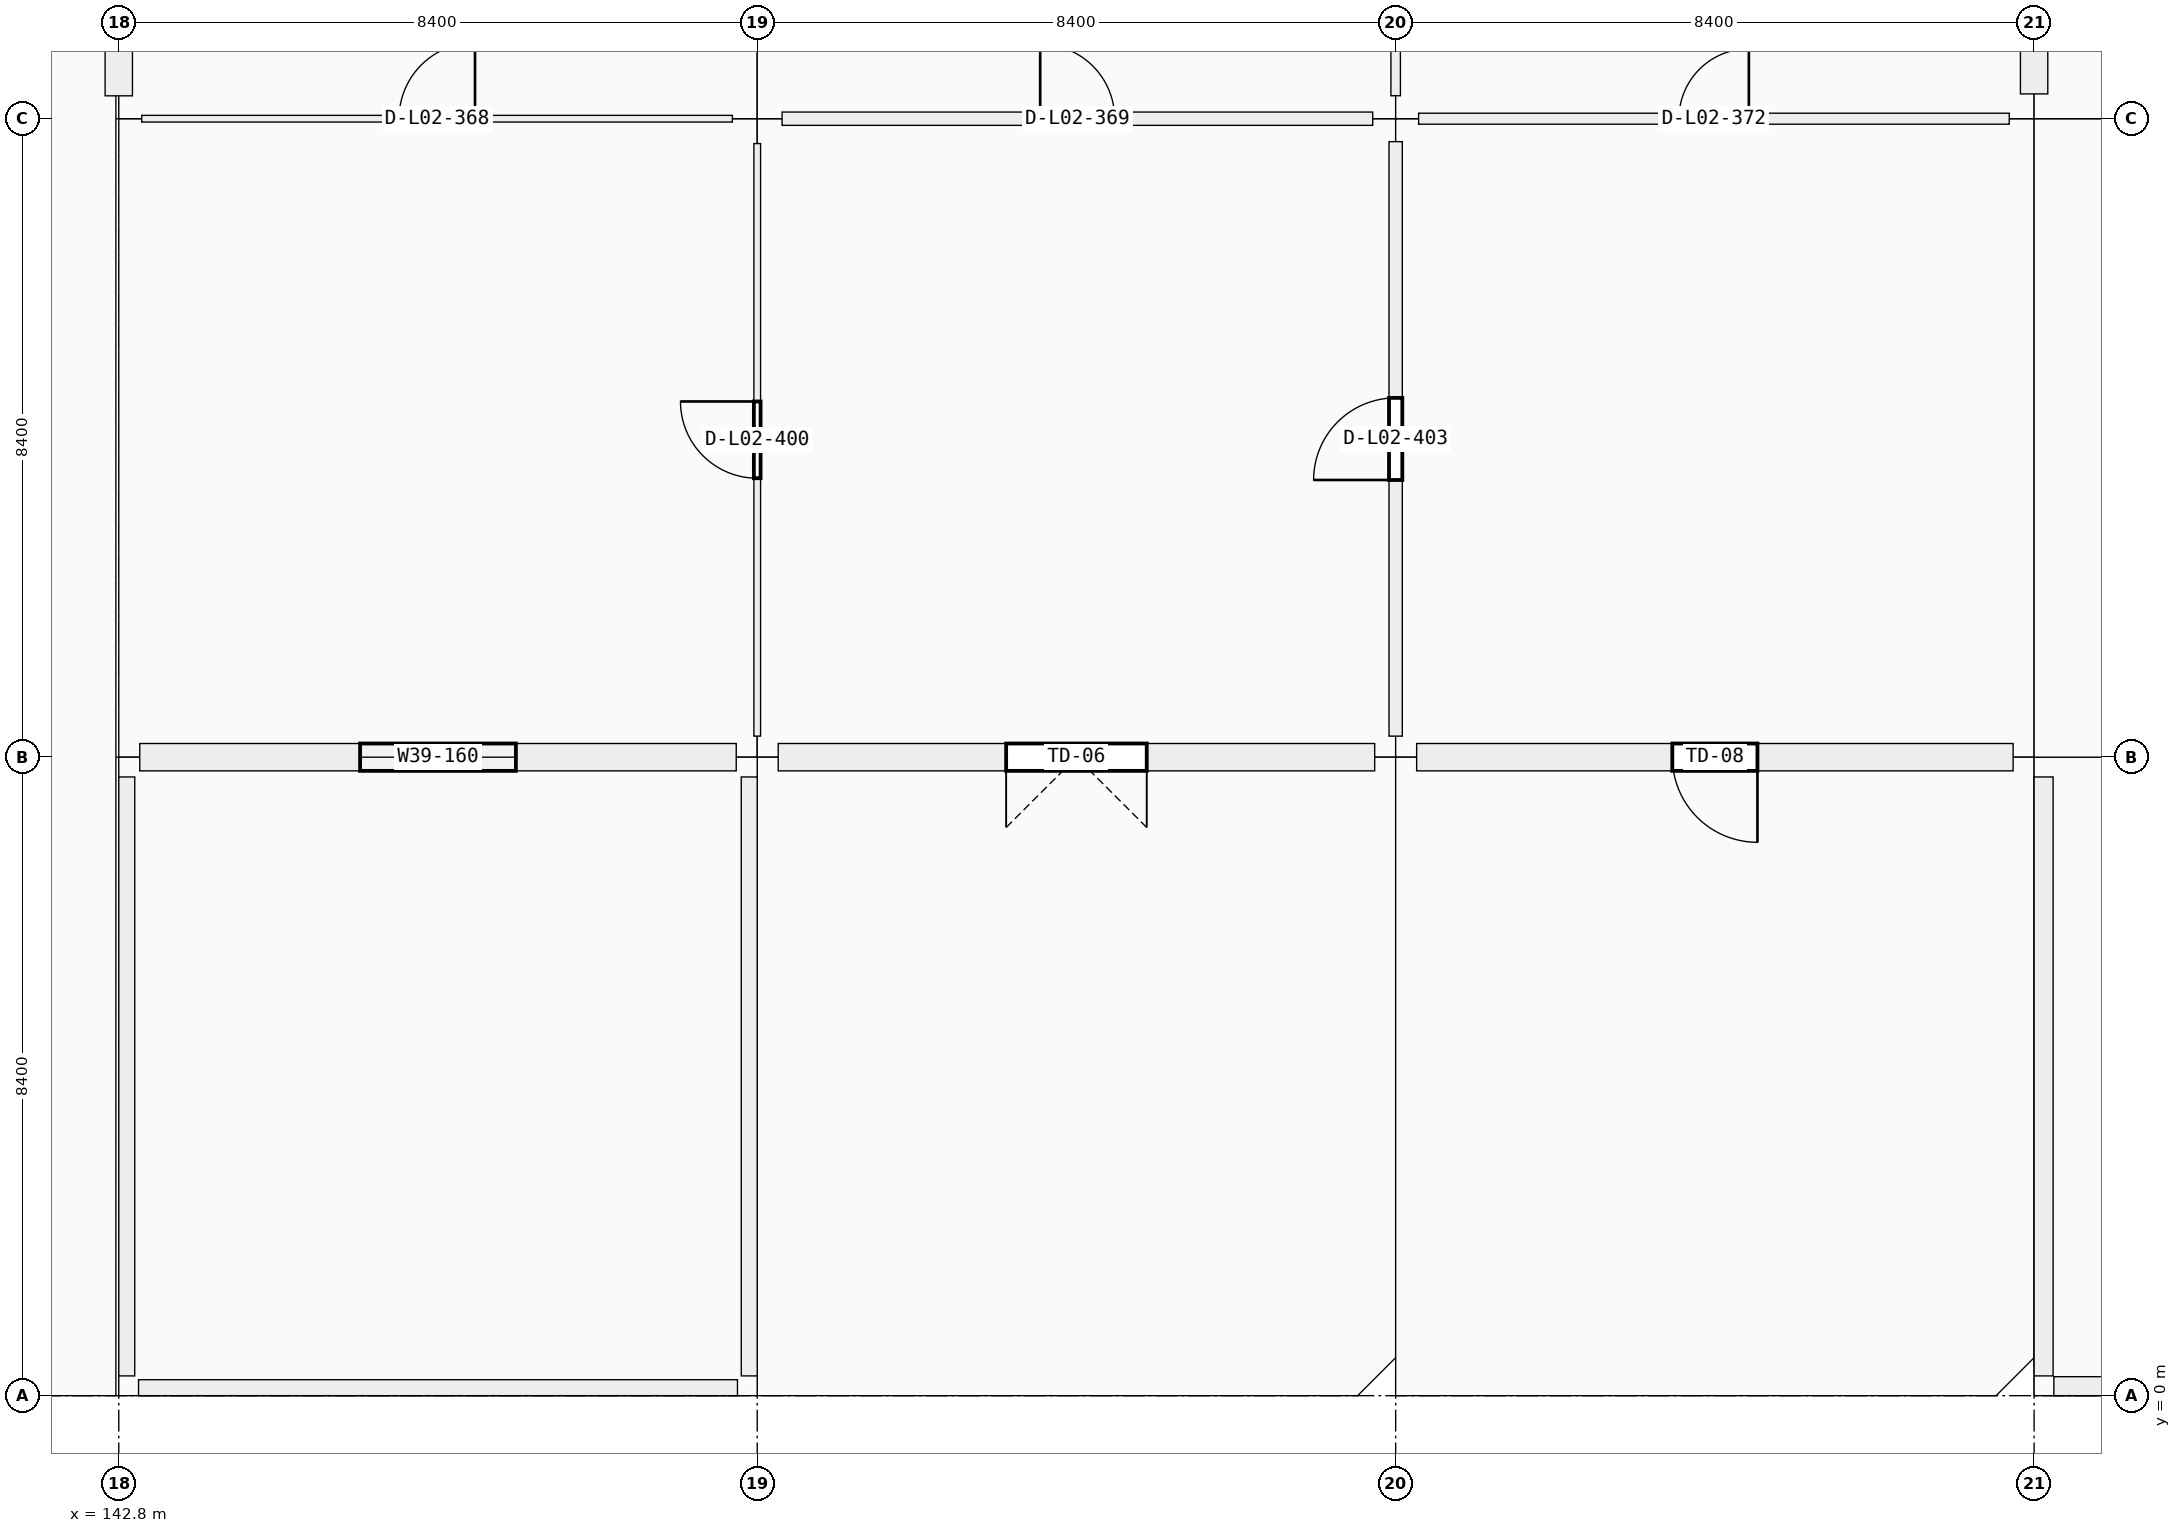
"""IFC4 building model, lengths in metres.
Left out: names, types, materials, properties, quantities, classifications, styles, units other than length and angle.
Written with IfcOpenShell. Run it as: python <this file> out.ifc"""

import sys

from ifc_helpers import new_model, si_unit, direction, frame, frame_2d, origin, origin_2d, place, context, subcontext, project, spatial, rectangle, extrude, element, fill, save


model = new_model("IFC4")
c1 = context("Model", 3, precision=1e-05, world=origin(), true_north=direction((0.0, 1.0)))
c2 = subcontext(c1, "Body", "Model", "MODEL_VIEW")
j1 = project(units=[si_unit("LENGTHUNIT", "METRE"), si_unit("PLANEANGLEUNIT", "RADIAN")], contexts=[c1])
p1 = place(None, origin())
s1 = spatial("IfcSite", under=j1, at=p1, CompositionType="ELEMENT")
p2 = place(p1, origin())
s2 = spatial("IfcBuilding", under=s1, at=p2, CompositionType="ELEMENT")
p3 = place(p2, frame((0.0, 0.0, 10.26)))
s3 = spatial("IfcBuildingStorey", under=s2, at=p3, CompositionType="ELEMENT", Elevation=10.26)
p4 = place(p3, frame((142.8, 8.4, 0.0), z_axis=(0.0, 0.0, 1.0), x_axis=(1.0, 0.0, 0.0)))
e1 = element("IfcColumn", 1, at=p4, inside=s3, PredefinedType="COLUMN", context=c2, shape_type="SweptSolid", body=[
    extrude(rectangle(XDim=0.55, YDim=0.55, at=origin_2d()), origin(), (0.0, 0.0, 1.0), 4.25),
])
p5 = place(p3, frame((142.8, 16.8, 0.0), z_axis=(0.0, 0.0, 1.0), x_axis=(1.0, 0.0, 0.0)))
e2 = element("IfcColumn", 2, at=p5, inside=s3, PredefinedType="COLUMN", context=c2, shape_type="SweptSolid", body=[
    extrude(rectangle(XDim=0.6, YDim=0.6, at=origin_2d()), origin(), (0.0, 0.0, 1.0), 4.5),
])
p6 = place(p3, frame((151.2, 8.4, 0.0), z_axis=(0.0, 0.0, 1.0), x_axis=(1.0, 0.0, 0.0)))
e3 = element("IfcColumn", 3, at=p6, inside=s3, PredefinedType="COLUMN", context=c2, shape_type="SweptSolid", body=[
    extrude(rectangle(XDim=0.55, YDim=0.55, at=origin_2d()), origin(), (0.0, 0.0, 1.0), 4.25),
])
p7 = place(p3, frame((151.2, 16.8, 0.0), z_axis=(0.0, 0.0, 1.0), x_axis=(1.0, 0.0, 0.0)))
e4 = element("IfcColumn", 4, at=p7, inside=s3, PredefinedType="COLUMN", context=c2, shape_type="SweptSolid", body=[
    extrude(rectangle(XDim=0.65, YDim=0.65, at=origin_2d()), origin(), (0.0, 0.0, 1.0), 4.5),
])
p8 = place(p3, frame((159.6, 8.4, 0.0), z_axis=(0.0, 0.0, 1.0), x_axis=(1.0, 0.0, 0.0)))
e5 = element("IfcColumn", 5, at=p8, inside=s3, PredefinedType="COLUMN", context=c2, shape_type="SweptSolid", body=[
    extrude(rectangle(XDim=0.55, YDim=0.55, at=origin_2d()), origin(), (0.0, 0.0, 1.0), 4.25),
])
p9 = place(p3, frame((159.6, 16.8, 0.0), z_axis=(0.0, 0.0, 1.0), x_axis=(1.0, 0.0, 0.0)))
e6 = element("IfcColumn", 6, at=p9, inside=s3, PredefinedType="COLUMN", context=c2, shape_type="SweptSolid", body=[
    extrude(rectangle(XDim=0.6, YDim=0.6, at=origin_2d()), origin(), (0.0, 0.0, 1.0), 4.5),
])
p10 = place(p3, frame((168.0, 8.4, 0.0), z_axis=(0.0, 0.0, 1.0), x_axis=(1.0, 0.0, 0.0)))
e7 = element("IfcColumn", 7, at=p10, inside=s3, PredefinedType="COLUMN", context=c2, shape_type="SweptSolid", body=[
    extrude(rectangle(XDim=0.55, YDim=0.55, at=origin_2d()), origin(), (0.0, 0.0, 1.0), 4.25),
])
p11 = place(p3, frame((168.0, 16.8, 0.0), z_axis=(0.0, 0.0, 1.0), x_axis=(1.0, 0.0, 0.0)))
e8 = element("IfcColumn", 8, at=p11, inside=s3, PredefinedType="COLUMN", context=c2, shape_type="SweptSolid", body=[
    extrude(rectangle(XDim=0.65, YDim=0.65, at=origin_2d()), origin(), (0.0, 0.0, 1.0), 4.5),
])
p12 = place(p3, frame((150.924, 8.4, 0.0), z_axis=(0.0, 0.0, 1.0), x_axis=(-1.0, 0.0, 0.0)))
e9 = element("IfcWall", 9, at=p12, inside=s3, PredefinedType="SOLIDWALL", context=c2, shape_type="SweptSolid", body=[
    extrude(rectangle(XDim=7.848, YDim=0.36, at=frame_2d((3.924, 0.0))), origin(), (0.0, 0.0, 1.0), 3.54),
])
p13 = place(p12, frame((2.899, 0.0, 0.9)))
e10 = element("IfcOpeningElement", 10, at=p13, cuts=e9, PredefinedType="OPENING", context=c2, shape_type="SweptSolid", body=[
    extrude(rectangle(XDim=2.05, YDim=1.45, at=frame_2d((1.025, 0.725))), frame((0.0, 0.18, 0.0), z_axis=(0.0, -1.0, 0.0), x_axis=(1.0, 0.0, 0.0)), (0.0, 0.0, 1.0), 0.36),
])
p14 = place(p3, frame((142.8, 17.101, 0.0), z_axis=(0.0, 0.0, 1.0), x_axis=(0.0, 1.0, 0.0)))
e11 = element("IfcWall", 11, at=p14, inside=s3, PredefinedType="SOLIDWALL", context=c2, shape_type="SweptSolid", body=[
    extrude(rectangle(XDim=7.773, YDim=0.36, at=frame_2d((3.886, 0.0))), origin(), (0.0, 0.0, 1.0), 3.54),
])
p15 = place(p14, frame((2.661, 0.0, 0.9)))
e12 = element("IfcOpeningElement", 12, at=p15, cuts=e11, PredefinedType="OPENING", context=c2, shape_type="SweptSolid", body=[
    extrude(rectangle(XDim=2.45, YDim=1.45, at=frame_2d((1.225, 0.725))), frame((0.0, 0.18, 0.0), z_axis=(0.0, -1.0, 0.0), x_axis=(1.0, 0.0, 0.0)), (0.0, 0.0, 1.0), 0.36),
])
p16 = place(p3, frame((159.324, 8.4, 0.0), z_axis=(0.0, 0.0, 1.0), x_axis=(-1.0, 0.0, 0.0)))
e13 = element("IfcWall", 13, at=p16, inside=s3, PredefinedType="SOLIDWALL", context=c2, shape_type="SweptSolid", body=[
    extrude(rectangle(XDim=7.848, YDim=0.36, at=frame_2d((3.924, 0.0))), origin(), (0.0, 0.0, 1.0), 3.54),
])
p17 = place(p16, frame((2.999, 0.0, 0.0)))
e14 = element("IfcOpeningElement", 14, at=p17, cuts=e13, PredefinedType="OPENING", context=c2, shape_type="SweptSolid", body=[
    extrude(rectangle(XDim=1.85, YDim=2.2, at=frame_2d((0.925, 1.1))), frame((0.0, 0.18, 0.0), z_axis=(0.0, -1.0, 0.0), x_axis=(1.0, 0.0, 0.0)), (0.0, 0.0, 1.0), 0.36),
])
p18 = place(p3, frame((167.724, 8.4, 0.0), z_axis=(0.0, 0.0, 1.0), x_axis=(-1.0, 0.0, 0.0)))
e15 = element("IfcWall", 15, at=p18, inside=s3, PredefinedType="SOLIDWALL", context=c2, shape_type="SweptSolid", body=[
    extrude(rectangle(XDim=7.848, YDim=0.36, at=frame_2d((3.924, 0.0))), origin(), (0.0, 0.0, 1.0), 3.54),
])
p19 = place(p18, frame((3.364, 0.0, 0.0)))
e16 = element("IfcOpeningElement", 16, at=p19, cuts=e15, PredefinedType="OPENING", context=c2, shape_type="SweptSolid", body=[
    extrude(rectangle(XDim=1.12, YDim=2.2, at=frame_2d((0.56, 1.1))), frame((0.0, 0.18, 0.0), z_axis=(0.0, -1.0, 0.0), x_axis=(1.0, 0.0, 0.0)), (0.0, 0.0, 1.0), 0.36),
])
p20 = place(p3, frame((168.0, 24.899, 0.0), z_axis=(0.0, 0.0, 1.0), x_axis=(0.0, -1.0, 0.0)))
e17 = element("IfcWall", 17, at=p20, inside=s3, PredefinedType="SOLIDWALL", context=c2, shape_type="SweptSolid", body=[
    extrude(rectangle(XDim=7.773, YDim=0.36, at=frame_2d((3.886, 0.0))), origin(), (0.0, 0.0, 1.0), 3.54),
])
p21 = place(p20, frame((3.087, 0.0, 0.9)))
e18 = element("IfcOpeningElement", 18, at=p21, cuts=e17, PredefinedType="OPENING", context=c2, shape_type="SweptSolid", body=[
    extrude(rectangle(XDim=1.6, YDim=2.1, at=frame_2d((0.8, 1.05))), frame((0.0, 0.18, 0.0), z_axis=(0.0, -1.0, 0.0), x_axis=(1.0, 0.0, 0.0)), (0.0, 0.0, 1.0), 0.36),
])
for number, where, z_axis, x_axis in (
    (19, (150.94, 0.105, 0.0), (0.0, 0.0, 1.0), (-1.0, 0.0, 0.0)),
    (20, (142.905, 0.26, 0.0), (0.0, 0.0, 1.0), (0.0, 1.0, 0.0)),
    (21, (151.095, 8.14, 0.0), (0.0, 0.0, 1.0), (0.0, -1.0, 0.0)),
):
    element("IfcWall", number, at=place(p3, frame(where, z_axis=z_axis, x_axis=x_axis)), inside=s3, PredefinedType="PARAPET", context=c2, shape_type="SweptSolid", body=[
        extrude(rectangle(XDim=7.88, YDim=0.21, at=frame_2d((3.94, 0.0))), origin(), (0.0, 0.0, 1.0), 0.95),
    ])
for number, where, z_axis, x_axis in (
    (22, (176.14, 0.125, 0.0), (0.0, 0.0, 1.0), (-1.0, 0.0, 0.0)),
    (23, (168.125, 0.26, 0.0), (0.0, 0.0, 1.0), (0.0, 1.0, 0.0)),
):
    element("IfcWall", number, at=place(p3, frame(where, z_axis=z_axis, x_axis=x_axis)), inside=s3, PredefinedType="PARAPET", context=c2, shape_type="SweptSolid", body=[
        extrude(rectangle(XDim=7.88, YDim=0.25, at=frame_2d((3.94, 0.0))), origin(), (0.0, 0.0, 1.0), 0.95),
    ])
p22 = place(p3, frame((143.102, 16.8, 0.0), z_axis=(0.0, 0.0, 1.0), x_axis=(1.0, 0.0, 0.0)))
e24 = element("IfcWall", 24, at=p22, inside=s3, PredefinedType="PARTITIONING", context=c2, shape_type="SweptSolid", body=[
    extrude(rectangle(XDim=7.771, YDim=0.088, at=frame_2d((3.885, 0.0))), origin(), (0.0, 0.0, 1.0), 3.37),
])
p23 = place(p22, frame((3.385, 0.0, 0.0)))
e25 = element("IfcOpeningElement", 25, at=p23, cuts=e24, PredefinedType="OPENING", context=c2, shape_type="SweptSolid", body=[
    extrude(rectangle(XDim=1.0, YDim=2.2, at=frame_2d((0.5, 1.1))), frame((0.0, 0.044, 0.0), z_axis=(0.0, -1.0, 0.0), x_axis=(1.0, 0.0, 0.0)), (0.0, 0.0, 1.0), 0.088),
])
p24 = place(p3, frame((151.527, 16.8, 0.0), z_axis=(0.0, 0.0, 1.0), x_axis=(1.0, 0.0, 0.0)))
e26 = element("IfcWall", 26, at=p24, inside=s3, PredefinedType="PARTITIONING", context=c2, shape_type="SweptSolid", body=[
    extrude(rectangle(XDim=7.771, YDim=0.175, at=frame_2d((3.885, 0.0))), origin(), (0.0, 0.0, 1.0), 3.37),
])
p25 = place(p24, frame((3.396, 0.0, 0.0)))
e27 = element("IfcOpeningElement", 27, at=p25, cuts=e26, PredefinedType="OPENING", context=c2, shape_type="SweptSolid", body=[
    extrude(rectangle(XDim=0.98, YDim=2.18, at=frame_2d((0.49, 1.09))), frame((0.0, 0.087, 0.0), z_axis=(0.0, -1.0, 0.0), x_axis=(1.0, 0.0, 0.0)), (0.0, 0.0, 1.0), 0.175),
])
p26 = place(p3, frame((159.902, 16.8, 0.0), z_axis=(0.0, 0.0, 1.0), x_axis=(1.0, 0.0, 0.0)))
e28 = element("IfcWall", 28, at=p26, inside=s3, PredefinedType="PARTITIONING", context=c2, shape_type="SweptSolid", body=[
    extrude(rectangle(XDim=7.771, YDim=0.145, at=frame_2d((3.885, 0.0))), origin(), (0.0, 0.0, 1.0), 3.37),
])
p27 = place(p26, frame((3.425, 0.0, 0.0)))
e29 = element("IfcOpeningElement", 29, at=p27, cuts=e28, PredefinedType="OPENING", context=c2, shape_type="SweptSolid", body=[
    extrude(rectangle(XDim=0.92, YDim=2.15, at=frame_2d((0.46, 1.075))), frame((0.0, 0.073, 0.0), z_axis=(0.0, -1.0, 0.0), x_axis=(1.0, 0.0, 0.0)), (0.0, 0.0, 1.0), 0.145),
])
p28 = place(p3, frame((151.2, 8.677, 0.0), z_axis=(0.0, 0.0, 1.0), x_axis=(0.0, 1.0, 0.0)))
e30 = element("IfcWall", 30, at=p28, inside=s3, PredefinedType="PARTITIONING", context=c2, shape_type="SweptSolid", body=[
    extrude(rectangle(XDim=7.796, YDim=0.088, at=frame_2d((3.898, 0.0))), origin(), (0.0, 0.0, 1.0), 3.37),
])
p29 = place(p28, frame((3.393, 0.0, 0.0)))
e31 = element("IfcOpeningElement", 31, at=p29, cuts=e30, PredefinedType="OPENING", context=c2, shape_type="SweptSolid", body=[
    extrude(rectangle(XDim=1.01, YDim=2.12, at=frame_2d((0.505, 1.06))), frame((0.0, 0.044, 0.0), z_axis=(0.0, -1.0, 0.0), x_axis=(1.0, 0.0, 0.0)), (0.0, 0.0, 1.0), 0.088),
])
p30 = place(p3, frame((159.6, 8.677, 0.0), z_axis=(0.0, 0.0, 1.0), x_axis=(0.0, 1.0, 0.0)))
e32 = element("IfcWall", 32, at=p30, inside=s3, PredefinedType="PARTITIONING", context=c2, shape_type="SweptSolid", body=[
    extrude(rectangle(XDim=7.821, YDim=0.175, at=frame_2d((3.911, 0.0))), origin(), (0.0, 0.0, 1.0), 3.37),
])
p31 = place(p30, frame((3.37, 0.0, 0.0)))
e33 = element("IfcOpeningElement", 33, at=p31, cuts=e32, PredefinedType="OPENING", context=c2, shape_type="SweptSolid", body=[
    extrude(rectangle(XDim=1.08, YDim=2.25, at=frame_2d((0.54, 1.125))), frame((0.0, 0.087, 0.0), z_axis=(0.0, -1.0, 0.0), x_axis=(1.0, 0.0, 0.0)), (0.0, 0.0, 1.0), 0.175),
])
p32 = place(p3, frame((159.6, 17.102, 0.0), z_axis=(0.0, 0.0, 1.0), x_axis=(0.0, 1.0, 0.0)))
e34 = element("IfcWall", 34, at=p32, inside=s3, PredefinedType="PARTITIONING", context=c2, shape_type="SweptSolid", body=[
    extrude(rectangle(XDim=7.771, YDim=0.125, at=frame_2d((3.885, 0.0))), origin(), (0.0, 0.0, 1.0), 3.37),
])
p33 = place(p32, frame((3.356, 0.0, 0.0)))
e35 = element("IfcOpeningElement", 35, at=p33, cuts=e34, PredefinedType="OPENING", context=c2, shape_type="SweptSolid", body=[
    extrude(rectangle(XDim=1.06, YDim=2.25, at=frame_2d((0.53, 1.125))), frame((0.0, 0.062, 0.0), z_axis=(0.0, -1.0, 0.0), x_axis=(1.0, 0.0, 0.0)), (0.0, 0.0, 1.0), 0.125),
])
p34 = place(p13, origin())
e36 = element("IfcWindow", 36, at=p34, inside=s3, PartitioningType="SINGLE_PANEL", PredefinedType="WINDOW", context=c2, shape_type="SweptSolid", body=[
    extrude(rectangle(XDim=2.05, YDim=1.45, at=frame_2d((1.025, 0.725))), frame((0.0, 0.03, 0.0), z_axis=(0.0, -1.0, 0.0), x_axis=(1.0, 0.0, 0.0)), (0.0, 0.0, 1.0), 0.06),
])
fill(e10, e36)
p35 = place(p17, origin())
e37 = element("IfcDoor", 37, at=p35, inside=s3, OperationType="DOUBLE_DOOR_SINGLE_SWING", PredefinedType="DOOR", context=c2, shape_type="SweptSolid", body=[
    extrude(rectangle(XDim=1.85, YDim=2.2, at=frame_2d((0.925, 1.1))), frame((0.0, 0.025, 0.0), z_axis=(0.0, -1.0, 0.0), x_axis=(1.0, 0.0, 0.0)), (0.0, 0.0, 1.0), 0.05),
])
fill(e14, e37)
p36 = place(p19, origin())
e38 = element("IfcDoor", 38, at=p36, inside=s3, OperationType="SINGLE_SWING_LEFT", PredefinedType="DOOR", context=c2, shape_type="SweptSolid", body=[
    extrude(rectangle(XDim=1.12, YDim=2.2, at=frame_2d((0.56, 1.1))), frame((0.0, 0.025, 0.0), z_axis=(0.0, -1.0, 0.0), x_axis=(1.0, 0.0, 0.0)), (0.0, 0.0, 1.0), 0.05),
])
fill(e16, e38)
p37 = place(p23, origin())
e39 = element("IfcDoor", 39, at=p37, inside=s3, OperationType="SINGLE_SWING_RIGHT", PredefinedType="DOOR", context=c2, shape_type="SweptSolid", body=[
    extrude(rectangle(XDim=1.0, YDim=2.2, at=frame_2d((0.5, 1.1))), frame((0.0, 0.025, 0.0), z_axis=(0.0, -1.0, 0.0), x_axis=(1.0, 0.0, 0.0)), (0.0, 0.0, 1.0), 0.05),
])
fill(e25, e39)
p38 = place(p25, origin())
e40 = element("IfcDoor", 40, at=p38, inside=s3, OperationType="SINGLE_SWING_LEFT", PredefinedType="DOOR", context=c2, shape_type="SweptSolid", body=[
    extrude(rectangle(XDim=0.98, YDim=2.18, at=frame_2d((0.49, 1.09))), frame((0.0, 0.025, 0.0), z_axis=(0.0, -1.0, 0.0), x_axis=(1.0, 0.0, 0.0)), (0.0, 0.0, 1.0), 0.05),
])
fill(e27, e40)
p39 = place(p27, origin())
e41 = element("IfcDoor", 41, at=p39, inside=s3, OperationType="SINGLE_SWING_RIGHT", PredefinedType="DOOR", context=c2, shape_type="SweptSolid", body=[
    extrude(rectangle(XDim=0.92, YDim=2.15, at=frame_2d((0.46, 1.075))), frame((0.0, 0.025, 0.0), z_axis=(0.0, -1.0, 0.0), x_axis=(1.0, 0.0, 0.0)), (0.0, 0.0, 1.0), 0.05),
])
fill(e29, e41)
p40 = place(p29, origin())
e42 = element("IfcDoor", 42, at=p40, inside=s3, OperationType="SINGLE_SWING_RIGHT", PredefinedType="DOOR", context=c2, shape_type="SweptSolid", body=[
    extrude(rectangle(XDim=1.01, YDim=2.12, at=frame_2d((0.505, 1.06))), frame((0.0, 0.025, 0.0), z_axis=(0.0, -1.0, 0.0), x_axis=(1.0, 0.0, 0.0)), (0.0, 0.0, 1.0), 0.05),
])
fill(e31, e42)
p41 = place(p31, origin())
e43 = element("IfcDoor", 43, at=p41, inside=s3, OperationType="SINGLE_SWING_LEFT", PredefinedType="DOOR", context=c2, shape_type="SweptSolid", body=[
    extrude(rectangle(XDim=1.08, YDim=2.25, at=frame_2d((0.54, 1.125))), frame((0.0, 0.025, 0.0), z_axis=(0.0, -1.0, 0.0), x_axis=(1.0, 0.0, 0.0)), (0.0, 0.0, 1.0), 0.05),
])
fill(e33, e43)
save(model, sys.argv[1])
